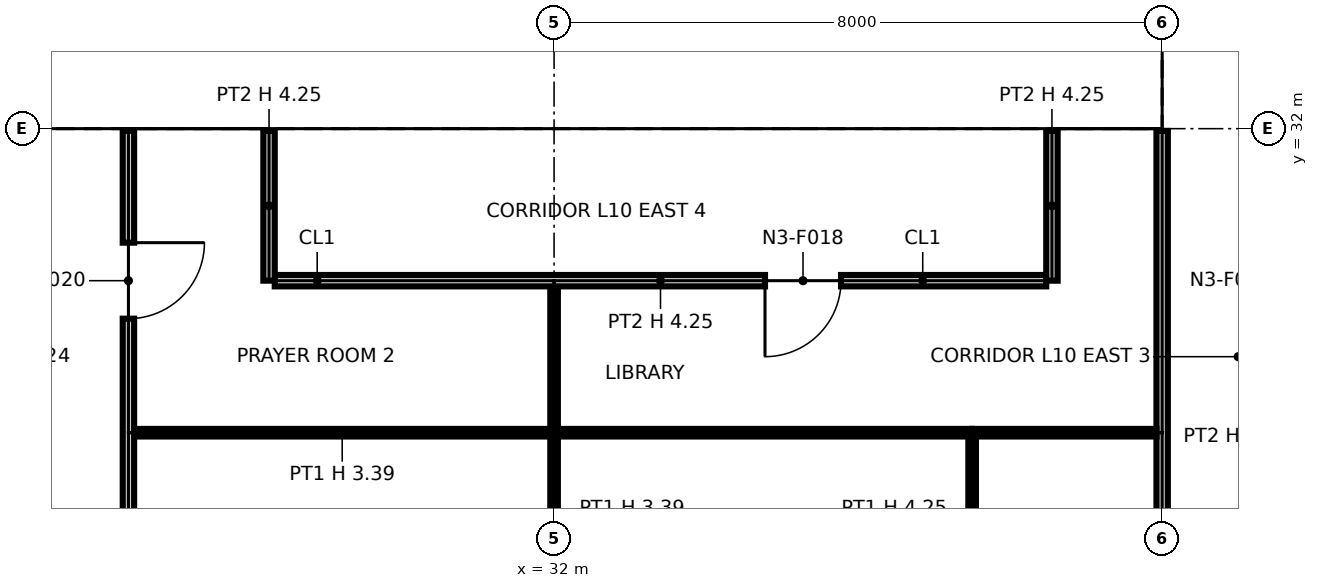
"""IFC4 building model, lengths in metres.
Left out: names, types, materials, properties, quantities, classifications, styles, units other than length and angle.
Written with IfcOpenShell. Run it as: python <this file> out.ifc"""

import sys

from ifc_helpers import new_model, si_unit, direction, frame, frame_2d, origin, origin_2d, place, context, subcontext, project, spatial, polyline, rectangle, i_section, outline, extrude, element, fill, save


model = new_model("IFC4")
c1 = context("Model", 3, precision=1e-05, world=origin(), true_north=direction((0.0, 1.0)))
c2 = subcontext(c1, "Body", "Model", "MODEL_VIEW")
j1 = project(units=[si_unit("LENGTHUNIT", "METRE"), si_unit("PLANEANGLEUNIT", "RADIAN")], contexts=[c1])
p1 = place(None, origin())
s1 = spatial("IfcSite", under=j1, at=p1, CompositionType="ELEMENT")
p2 = place(p1, origin())
s2 = spatial("IfcBuilding", under=s1, at=p2, CompositionType="ELEMENT")
p3 = place(p2, frame((0.0, 0.0, 61.2)))
s3 = spatial("IfcBuildingStorey", under=s2, at=p3, CompositionType="ELEMENT", Elevation=61.2)
for number, where, z_axis, x_axis in (
    (1, (32.0, 32.0, 0.0), (0.0, 0.0, 1.0), (1.0, 0.0, 0.0)),
    (2, (40.0, 32.0, 0.0), (0.0, 0.0, 1.0), (1.0, 0.0, 0.0)),
):
    element("IfcColumn", number, at=place(p3, frame(where, z_axis=z_axis, x_axis=x_axis)), inside=s3, PredefinedType="COLUMN", context=c2, shape_type="SweptSolid", body=[
        extrude(i_section(OverallWidth=0.371, OverallDepth=0.361, WebThickness=0.012, FlangeThickness=0.02, at=origin_2d()), origin(), (0.0, 0.0, 1.0), 4.25),
    ])
p4 = place(p3, frame((24.65, 32.75, 0.0), z_axis=(0.0, 0.0, 1.0), x_axis=(1.0, 0.0, 0.0)))
e3 = element("IfcWall", 3, at=p4, inside=s3, PredefinedType="PARTITIONING", context=c2, shape_type="SweptSolid", body=[
    extrude(outline(polyline([(0.0, 0.0), (14.7, 0.0), (14.7, 4.25), (7.469, 4.25), (7.469, 3.632), (7.231, 3.632), (7.23, 4.25), (0.0, 4.25), (0.0, 0.0)])), frame((0.0, 0.1, 0.0), z_axis=(0.0, -1.0, 0.0), x_axis=(1.0, 0.0, 0.0)), (0.0, 0.0, 1.0), 0.2),
])
p5 = place(p4, frame((4.1, 0.0, 0.0)))
e4 = element("IfcOpeningElement", 4, at=p5, cuts=e3, PredefinedType="OPENING", context=c2, shape_type="SweptSolid", body=[
    extrude(rectangle(XDim=1.8, YDim=2.1, at=frame_2d((0.9, 1.05))), frame((0.0, 0.11, 0.0), z_axis=(0.0, -1.0, 0.0), x_axis=(1.0, 0.0, 0.0)), (0.0, 0.0, 1.0), 0.22),
])
p6 = place(p4, frame((8.55, 0.0, 0.0)))
e5 = element("IfcOpeningElement", 5, at=p6, cuts=e3, PredefinedType="OPENING", context=c2, shape_type="SweptSolid", body=[
    extrude(rectangle(XDim=1.4, YDim=2.1, at=frame_2d((0.7, 1.05))), frame((0.0, 0.11, 0.0), z_axis=(0.0, -1.0, 0.0), x_axis=(1.0, 0.0, 0.0)), (0.0, 0.0, 1.0), 0.22),
])
p7 = place(p4, frame((12.0, 0.0, 0.0)))
e6 = element("IfcOpeningElement", 6, at=p7, cuts=e3, PredefinedType="OPENING", context=c2, shape_type="SweptSolid", body=[
    extrude(rectangle(XDim=1.4, YDim=2.1, at=frame_2d((0.7, 1.05))), frame((0.0, 0.11, 0.0), z_axis=(0.0, -1.0, 0.0), x_axis=(1.0, 0.0, 0.0)), (0.0, 0.0, 1.0), 0.22),
])
p8 = place(p3, frame((26.875, 32.85, 0.0), z_axis=(0.0, 0.0, 1.0), x_axis=(0.0, 1.0, 0.0)))
e7 = element("IfcWall", 7, at=p8, inside=s3, PredefinedType="PARTITIONING", context=c2, shape_type="SweptSolid", body=[
    extrude(rectangle(XDim=2.15, YDim=0.15, at=frame_2d((1.075, 0.0))), origin(), (0.0, 0.0, 1.0), 4.25),
])
p9 = place(p8, frame((0.6, 0.0, 0.0)))
e8 = element("IfcOpeningElement", 8, at=p9, cuts=e7, PredefinedType="OPENING", context=c2, shape_type="SweptSolid", body=[
    extrude(rectangle(XDim=0.9, YDim=2.1, at=frame_2d((0.45, 1.05))), frame((0.0, 0.085, 0.0), z_axis=(0.0, -1.0, 0.0), x_axis=(1.0, 0.0, 0.0)), (0.0, 0.0, 1.0), 0.17),
])
p10 = place(p3, frame((32.0, 32.85, 0.0), z_axis=(0.0, 0.0, 1.0), x_axis=(0.0, 1.0, 0.0)))
e9 = element("IfcWall", 9, at=p10, inside=s3, PredefinedType="PARTITIONING", context=c2, shape_type="SweptSolid", body=[
    extrude(rectangle(XDim=6.3, YDim=0.6, at=frame_2d((3.15, 0.0))), origin(), (0.0, 0.0, 1.0), 3.632),
])
for number, where, z_axis, x_axis in (
    (10, (35.6, 32.85, 0.0), (0.0, 0.0, 1.0), (0.0, 1.0, 0.0)),
    (11, (39.25, 32.85, 0.0), (0.0, 0.0, 1.0), (0.0, 1.0, 0.0)),
):
    element("IfcWall", number, at=place(p3, frame(where, z_axis=z_axis, x_axis=x_axis)), inside=s3, PredefinedType="PARTITIONING", context=c2, shape_type="SweptSolid", body=[
        extrude(rectangle(XDim=6.3, YDim=0.2, at=frame_2d((3.15, 0.0))), origin(), (0.0, 0.0, 1.0), 4.25),
    ])
p11 = place(p3, frame((26.4, 18.0, 0.0), z_axis=(0.0, 0.0, 1.0), x_axis=(0.0, 1.0, 0.0)))
e12 = element("IfcWall", 12, at=p11, inside=s3, PredefinedType="PARTITIONING", context=c2, shape_type="SweptSolid", body=[
    extrude(outline(polyline([(0.0, 0.0), (13.97, 0.0), (13.97, 4.25), (10.3, 4.25), (10.298, 3.391), (9.702, 3.391), (9.7, 4.25), (6.3, 4.25), (6.298, 3.391), (5.702, 3.391), (5.7, 4.25), (2.3, 4.25), (2.298, 3.391), (1.702, 3.391), (1.7, 4.25), (0.0, 4.25), (0.0, 0.0)])), frame((0.0, 0.075, 0.0), z_axis=(0.0, -1.0, 0.0), x_axis=(1.0, 0.0, 0.0)), (0.0, 0.0, 1.0), 0.15),
])
p12 = place(p11, frame((8.5, 0.0, 0.0), z_axis=(0.0, 0.0, 1.0), x_axis=(-1.0, 0.0, 0.0)))
e13 = element("IfcOpeningElement", 13, at=p12, cuts=e12, PredefinedType="OPENING", context=c2, shape_type="SweptSolid", body=[
    extrude(rectangle(XDim=1.0, YDim=2.1, at=frame_2d((0.5, 1.05))), frame((0.0, 0.085, 0.0), z_axis=(0.0, -1.0, 0.0), x_axis=(1.0, 0.0, 0.0)), (0.0, 0.0, 1.0), 0.17),
])
p13 = place(p11, frame((12.5, 0.0, 0.0), z_axis=(0.0, 0.0, 1.0), x_axis=(-1.0, 0.0, 0.0)))
e14 = element("IfcOpeningElement", 14, at=p13, cuts=e12, PredefinedType="OPENING", context=c2, shape_type="SweptSolid", body=[
    extrude(rectangle(XDim=1.0, YDim=2.1, at=frame_2d((0.5, 1.05))), frame((0.0, 0.085, 0.0), z_axis=(0.0, -1.0, 0.0), x_axis=(1.0, 0.0, 0.0)), (0.0, 0.0, 1.0), 0.17),
])
p14 = place(p3, frame((40.0, 18.0, 0.0), z_axis=(0.0, 0.0, 1.0), x_axis=(0.0, 1.0, 0.0)))
e15 = element("IfcWall", 15, at=p14, inside=s3, PredefinedType="PARTITIONING", context=c2, shape_type="SweptSolid", body=[
    extrude(rectangle(XDim=13.97, YDim=0.15, at=frame_2d((6.985, 0.0))), origin(), (0.0, 0.0, 1.0), 3.391),
])
p15 = place(p14, frame((7.5, 0.0, 0.0)))
e16 = element("IfcOpeningElement", 16, at=p15, cuts=e15, PredefinedType="OPENING", context=c2, shape_type="SweptSolid", body=[
    extrude(rectangle(XDim=1.0, YDim=2.1, at=frame_2d((0.5, 1.05))), frame((0.0, 0.085, 0.0), z_axis=(0.0, -1.0, 0.0), x_axis=(1.0, 0.0, 0.0)), (0.0, 0.0, 1.0), 0.17),
])
p16 = place(p3, frame((32.0, 24.0, 0.0), z_axis=(0.0, 0.0, 1.0), x_axis=(0.0, 1.0, 0.0)))
e17 = element("IfcWall", 17, at=p16, inside=s3, PredefinedType="PARTITIONING", context=c2, shape_type="SweptSolid", body=[
    extrude(rectangle(XDim=3.95, YDim=0.1, at=frame_2d((1.975, 0.0))), origin(), (0.0, 0.0, 1.0), 3.391),
])
p17 = place(p3, frame((37.5, 24.0, 0.0), z_axis=(0.0, 0.0, 1.0), x_axis=(0.0, 1.0, 0.0)))
e18 = element("IfcWall", 18, at=p17, inside=s3, PredefinedType="PARTITIONING", context=c2, shape_type="SweptSolid", body=[
    extrude(rectangle(XDim=3.95, YDim=0.1, at=frame_2d((1.975, 0.0))), origin(), (0.0, 0.0, 1.0), 4.25),
])
p18 = place(p17, frame((2.5, 0.0, 0.0), z_axis=(0.0, 0.0, 1.0), x_axis=(-1.0, 0.0, 0.0)))
e19 = element("IfcOpeningElement", 19, at=p18, cuts=e18, PredefinedType="OPENING", context=c2, shape_type="SweptSolid", body=[
    extrude(rectangle(XDim=1.0, YDim=2.1, at=frame_2d((0.5, 1.05))), frame((0.0, 0.06, 0.0), z_axis=(0.0, -1.0, 0.0), x_axis=(1.0, 0.0, 0.0)), (0.0, 0.0, 1.0), 0.12),
])
p19 = place(p3, frame((26.475, 28.0, 0.0), z_axis=(0.0, 0.0, 1.0), x_axis=(1.0, 0.0, 0.0)))
e20 = element("IfcWall", 20, at=p19, inside=s3, PredefinedType="PARTITIONING", context=c2, shape_type="SweptSolid", body=[
    extrude(rectangle(XDim=5.475, YDim=0.1, at=frame_2d((2.737, 0.0))), origin(), (0.0, 0.0, 1.0), 3.391),
])
p20 = place(p3, frame((32.05, 28.0, 0.0), z_axis=(0.0, 0.0, 1.0), x_axis=(1.0, 0.0, 0.0)))
e21 = element("IfcWall", 21, at=p20, inside=s3, PredefinedType="PARTITIONING", context=c2, shape_type="SweptSolid", body=[
    extrude(rectangle(XDim=5.45, YDim=0.1, at=frame_2d((2.725, 0.0))), origin(), (0.0, 0.0, 1.0), 3.391),
])
p21 = place(p3, frame((32.0, 28.0, 0.0), z_axis=(0.0, 0.0, 1.0), x_axis=(0.0, 1.0, 0.0)))
e22 = element("IfcWall", 22, at=p21, inside=s3, PredefinedType="PARTITIONING", context=c2, shape_type="SweptSolid", body=[
    extrude(rectangle(XDim=1.925, YDim=0.1, at=frame_2d((0.962, 0.0))), origin(), (0.0, 0.0, 1.0), 3.391),
])
p22 = place(p3, frame((37.5, 28.0, 0.0), z_axis=(0.0, 0.0, 1.0), x_axis=(1.0, 0.0, 0.0)))
e23 = element("IfcWall", 23, at=p22, inside=s3, PredefinedType="PARTITIONING", context=c2, shape_type="SweptSolid", body=[
    extrude(rectangle(XDim=2.425, YDim=0.1, at=frame_2d((1.212, 0.0))), origin(), (0.0, 0.0, 1.0), 3.391),
])
p23 = place(p3, frame((28.325, 30.0, 0.0), z_axis=(0.0, 0.0, 1.0), x_axis=(1.0, 0.0, 0.0)))
e24 = element("IfcWall", 24, at=p23, inside=s3, PredefinedType="PARTITIONING", context=c2, shape_type="SweptSolid", body=[
    extrude(rectangle(XDim=10.15, YDim=0.15, at=frame_2d((5.075, 0.0))), origin(), (0.0, 0.0, 1.0), 4.25),
])
p24 = place(p23, frame((7.45, 0.0, 0.0), z_axis=(0.0, 0.0, 1.0), x_axis=(-1.0, 0.0, 0.0)))
e25 = element("IfcOpeningElement", 25, at=p24, cuts=e24, PredefinedType="OPENING", context=c2, shape_type="SweptSolid", body=[
    extrude(rectangle(XDim=1.0, YDim=2.1, at=frame_2d((0.5, 1.05))), frame((0.0, 0.085, 0.0), z_axis=(0.0, -1.0, 0.0), x_axis=(1.0, 0.0, 0.0)), (0.0, 0.0, 1.0), 0.17),
])
for number, where, z_axis, x_axis in (
    (26, (28.25, 30.0, 0.0), (0.0, 0.0, 1.0), (0.0, 1.0, 0.0)),
    (27, (38.55, 30.0, 0.0), (0.0, 0.0, 1.0), (0.0, 1.0, 0.0)),
):
    element("IfcWall", number, at=place(p3, frame(where, z_axis=z_axis, x_axis=x_axis)), inside=s3, PredefinedType="PARTITIONING", context=c2, shape_type="SweptSolid", body=[
        extrude(rectangle(XDim=1.97, YDim=0.15, at=frame_2d((0.985, 0.0))), origin(), (0.0, 0.0, 1.0), 4.25),
    ])
p25 = place(p5, origin())
e28 = element("IfcDoor", 28, at=p25, inside=s3, OperationType="DOUBLE_DOOR_SINGLE_SWING", PredefinedType="NOTDEFINED", context=c2, shape_type="SweptSolid", body=[
    extrude(rectangle(XDim=1.8, YDim=2.1, at=frame_2d((0.9, 1.05))), frame((0.0, 0.025, 0.0), z_axis=(0.0, -1.0, 0.0), x_axis=(1.0, 0.0, 0.0)), (0.0, 0.0, 1.0), 0.05),
])
fill(e4, e28)
p26 = place(p6, origin())
e29 = element("IfcDoor", 29, at=p26, inside=s3, OperationType="DOUBLE_DOOR_SINGLE_SWING", PredefinedType="NOTDEFINED", context=c2, shape_type="SweptSolid", body=[
    extrude(rectangle(XDim=1.4, YDim=2.1, at=frame_2d((0.7, 1.05))), frame((0.0, 0.025, 0.0), z_axis=(0.0, -1.0, 0.0), x_axis=(1.0, 0.0, 0.0)), (0.0, 0.0, 1.0), 0.05),
])
fill(e5, e29)
p27 = place(p7, origin())
e30 = element("IfcDoor", 30, at=p27, inside=s3, OperationType="DOUBLE_DOOR_SINGLE_SWING", PredefinedType="NOTDEFINED", context=c2, shape_type="SweptSolid", body=[
    extrude(rectangle(XDim=1.4, YDim=2.1, at=frame_2d((0.7, 1.05))), frame((0.0, 0.025, 0.0), z_axis=(0.0, -1.0, 0.0), x_axis=(1.0, 0.0, 0.0)), (0.0, 0.0, 1.0), 0.05),
])
fill(e6, e30)
p28 = place(p24, origin())
e31 = element("IfcDoor", 31, at=p28, inside=s3, OperationType="SINGLE_SWING_RIGHT", PredefinedType="DOOR", context=c2, shape_type="SweptSolid", body=[
    extrude(rectangle(XDim=1.0, YDim=2.1, at=frame_2d((0.5, 1.05))), frame((0.0, 0.025, 0.0), z_axis=(0.0, -1.0, 0.0), x_axis=(1.0, 0.0, 0.0)), (0.0, 0.0, 1.0), 0.05),
])
fill(e25, e31)
p29 = place(p13, origin())
e32 = element("IfcDoor", 32, at=p29, inside=s3, OperationType="SINGLE_SWING_LEFT", PredefinedType="DOOR", context=c2, shape_type="SweptSolid", body=[
    extrude(rectangle(XDim=1.0, YDim=2.1, at=frame_2d((0.5, 1.05))), frame((0.0, 0.025, 0.0), z_axis=(0.0, -1.0, 0.0), x_axis=(1.0, 0.0, 0.0)), (0.0, 0.0, 1.0), 0.05),
])
fill(e14, e32)
save(model, sys.argv[1])
